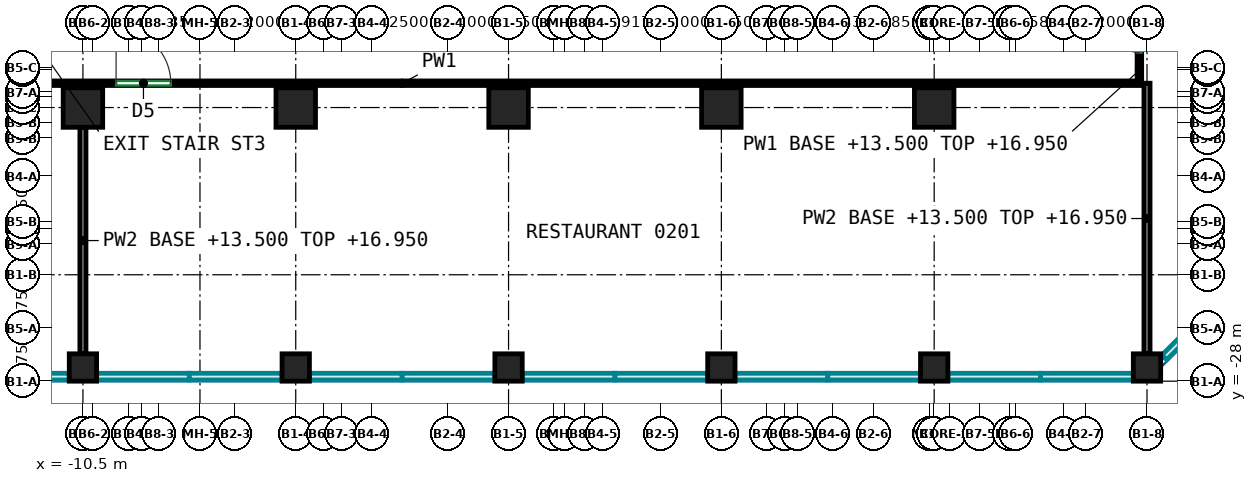
"""IFC4 building model, lengths in metres.
Left out: names, types, materials, properties, quantities, classifications, styles, units other than length and angle.
Written with IfcOpenShell. Run it as: python <this file> out.ifc"""

import sys

from ifc_helpers import new_model, si_unit, direction, frame, frame_2d, origin, origin_2d, place, context, subcontext, project, spatial, rectangle, extrude, source, transform, mapped, element, fill, save


model = new_model("IFC4")
c1 = context("Model", 3, precision=1e-05, world=origin(), true_north=direction((0.0, 1.0)))
c2 = subcontext(c1, "Body", "Model", "MODEL_VIEW")
j1 = project(units=[si_unit("LENGTHUNIT", "METRE"), si_unit("PLANEANGLEUNIT", "RADIAN")], contexts=[c1])
p1 = place(None, origin())
s1 = spatial("IfcSite", under=j1, at=p1, CompositionType="ELEMENT")
p2 = place(p1, origin())
s2 = spatial("IfcBuilding", under=s1, at=p2, CompositionType="ELEMENT")
p3 = place(p2, frame((0.0, 0.0, 13.5)))
s3 = spatial("IfcBuildingStorey", under=s2, at=p3, CompositionType="ELEMENT", Elevation=13.5)
m1 = source(origin(), c2, "Body", "SweptSolid", [
    extrude(rectangle(XDim=0.9, YDim=0.9, at=origin_2d()), origin(), (0.0, 0.0, 1.0), 4.1),
])
p4 = place(p3, frame((-10.5, -27.55, 0.0), z_axis=(0.0, 0.0, 1.0), x_axis=(1.0, 0.0, 0.0)))
e1 = element("IfcColumn", 1, at=p4, inside=s3, PredefinedType="COLUMN", context=c2, shape_type="MappedRepresentation", body=[
    mapped(m1, transform((0.0, 0.0, 0.0))),
])
m2 = source(origin(), c2, "Body", "SweptSolid", [
    extrude(rectangle(XDim=1.3, YDim=1.3, at=origin_2d()), origin(), (0.0, 0.0, 1.0), 4.1),
])
p5 = place(p3, frame((-10.5, -19.0, 0.0), z_axis=(0.0, 0.0, 1.0), x_axis=(1.0, 0.0, 0.0)))
e2 = element("IfcColumn", 2, at=p5, inside=s3, PredefinedType="COLUMN", context=c2, shape_type="MappedRepresentation", body=[
    mapped(m2, transform((0.0, 0.0, 0.0))),
])
p6 = place(p3, frame((-3.5, -27.55, 0.0), z_axis=(0.0, 0.0, 1.0), x_axis=(1.0, 0.0, 0.0)))
e3 = element("IfcColumn", 3, at=p6, inside=s3, PredefinedType="COLUMN", context=c2, shape_type="MappedRepresentation", body=[
    mapped(m1, transform((0.0, 0.0, 0.0))),
])
p7 = place(p3, frame((-3.5, -19.0, 0.0), z_axis=(0.0, 0.0, 1.0), x_axis=(1.0, 0.0, 0.0)))
e4 = element("IfcColumn", 4, at=p7, inside=s3, PredefinedType="COLUMN", context=c2, shape_type="MappedRepresentation", body=[
    mapped(m2, transform((0.0, 0.0, 0.0))),
])
p8 = place(p3, frame((3.5, -27.55, 0.0), z_axis=(0.0, 0.0, 1.0), x_axis=(1.0, 0.0, 0.0)))
e5 = element("IfcColumn", 5, at=p8, inside=s3, PredefinedType="COLUMN", context=c2, shape_type="MappedRepresentation", body=[
    mapped(m1, transform((0.0, 0.0, 0.0))),
])
p9 = place(p3, frame((3.5, -19.0, 0.0), z_axis=(0.0, 0.0, 1.0), x_axis=(1.0, 0.0, 0.0)))
e6 = element("IfcColumn", 6, at=p9, inside=s3, PredefinedType="COLUMN", context=c2, shape_type="MappedRepresentation", body=[
    mapped(m2, transform((0.0, 0.0, 0.0))),
])
p10 = place(p3, frame((10.5, -27.55, 0.0), z_axis=(0.0, 0.0, 1.0), x_axis=(1.0, 0.0, 0.0)))
e7 = element("IfcColumn", 7, at=p10, inside=s3, PredefinedType="COLUMN", context=c2, shape_type="MappedRepresentation", body=[
    mapped(m1, transform((0.0, 0.0, 0.0))),
])
p11 = place(p3, frame((10.5, -19.0, 0.0), z_axis=(0.0, 0.0, 1.0), x_axis=(1.0, 0.0, 0.0)))
e8 = element("IfcColumn", 8, at=p11, inside=s3, PredefinedType="COLUMN", context=c2, shape_type="MappedRepresentation", body=[
    mapped(m2, transform((0.0, 0.0, 0.0))),
])
p12 = place(p3, frame((17.5, -27.55, 0.0), z_axis=(0.0, 0.0, 1.0), x_axis=(1.0, 0.0, 0.0)))
e9 = element("IfcColumn", 9, at=p12, inside=s3, PredefinedType="COLUMN", context=c2, shape_type="MappedRepresentation", body=[
    mapped(m1, transform((0.0, 0.0, 0.0))),
])
p13 = place(p3, frame((17.5, -19.0, 0.0), z_axis=(0.0, 0.0, 1.0), x_axis=(1.0, 0.0, 0.0)))
e10 = element("IfcColumn", 10, at=p13, inside=s3, PredefinedType="COLUMN", context=c2, shape_type="MappedRepresentation", body=[
    mapped(m2, transform((0.0, 0.0, 0.0))),
])
p14 = place(p3, frame((24.5, -27.55, 0.0), z_axis=(0.0, 0.0, 1.0), x_axis=(1.0, 0.0, 0.0)))
e11 = element("IfcColumn", 11, at=p14, inside=s3, PredefinedType="COLUMN", context=c2, shape_type="MappedRepresentation", body=[
    mapped(m1, transform((0.0, 0.0, 0.0))),
])
p15 = place(p3, frame((-24.325, -18.2, 0.0), z_axis=(0.0, 0.0, 1.0), x_axis=(1.0, 0.0, 0.0)))
e12 = element("IfcWall", 12, at=p15, inside=s3, PredefinedType="PARTITIONING", context=c2, shape_type="SweptSolid", body=[
    extrude(rectangle(XDim=48.65, YDim=0.15, at=frame_2d((24.325, 0.0))), origin(), (0.0, 0.0, 1.0), 4.1),
])
p16 = place(p15, frame((11.314, 0.0, 0.0)))
e13 = element("IfcOpeningElement", 13, at=p16, cuts=e12, PredefinedType="OPENING", context=c2, shape_type="SweptSolid", body=[
    extrude(rectangle(XDim=0.9, YDim=2.1, at=frame_2d((0.45, 1.05))), frame((0.0, 0.085, 0.0), z_axis=(0.0, -1.0, 0.0), x_axis=(1.0, 0.0, 0.0)), (0.0, 0.0, 1.0), 0.17),
])
p17 = place(p15, frame((14.916, 0.0, 0.0)))
e14 = element("IfcOpeningElement", 14, at=p17, cuts=e12, PredefinedType="OPENING", context=c2, shape_type="SweptSolid", body=[
    extrude(rectangle(XDim=1.8, YDim=2.1, at=frame_2d((0.9, 1.05))), frame((0.0, 0.085, 0.0), z_axis=(0.0, -1.0, 0.0), x_axis=(1.0, 0.0, 0.0)), (0.0, 0.0, 1.0), 0.17),
])
p18 = place(p3, frame((24.25, -18.125, 0.0), z_axis=(0.0, 0.0, 1.0), x_axis=(0.0, 1.0, 0.0)))
e15 = element("IfcWall", 15, at=p18, inside=s3, PredefinedType="PARTITIONING", context=c2, shape_type="SweptSolid", body=[
    extrude(rectangle(XDim=2.35, YDim=0.15, at=frame_2d((1.175, 0.0))), origin(), (0.0, 0.0, 1.0), 3.45),
])
p19 = place(p18, frame((0.935, 0.0, 0.0)))
e16 = element("IfcOpeningElement", 16, at=p19, cuts=e15, PredefinedType="OPENING", context=c2, shape_type="SweptSolid", body=[
    extrude(rectangle(XDim=0.9, YDim=2.1, at=frame_2d((0.45, 1.05))), frame((0.0, 0.085, 0.0), z_axis=(0.0, -1.0, 0.0), x_axis=(1.0, 0.0, 0.0)), (0.0, 0.0, 1.0), 0.17),
])
p20 = place(p3, frame((-10.5, -27.1, 0.0), z_axis=(0.0, 0.0, 1.0), x_axis=(0.0, 1.0, 0.0)))
e17 = element("IfcWall", 17, at=p20, inside=s3, PredefinedType="PARTITIONING", context=c2, shape_type="SweptSolid", body=[
    extrude(rectangle(XDim=7.45, YDim=0.2, at=frame_2d((3.725, 0.0))), origin(), (0.0, 0.0, 1.0), 3.45),
])
p21 = place(p3, frame((24.5, -27.1, 0.0), z_axis=(0.0, 0.0, 1.0), x_axis=(0.0, 1.0, 0.0)))
e18 = element("IfcWall", 18, at=p21, inside=s3, PredefinedType="PARTITIONING", context=c2, shape_type="SweptSolid", body=[
    extrude(rectangle(XDim=8.9, YDim=0.2, at=frame_2d((4.45, 0.0))), origin(), (0.0, 0.0, 1.0), 3.45),
])
p22 = place(p17, origin())
e19 = element("IfcDoor", 19, at=p22, inside=s3, OperationType="DOUBLE_DOOR_SINGLE_SWING", PredefinedType="DOOR", context=c2, shape_type="SweptSolid", body=[
    extrude(rectangle(XDim=1.8, YDim=2.1, at=frame_2d((0.9, 1.05))), frame((0.0, 0.025, 0.0), z_axis=(0.0, -1.0, 0.0), x_axis=(1.0, 0.0, 0.0)), (0.0, 0.0, 1.0), 0.05),
])
fill(e14, e19)
save(model, sys.argv[1])
